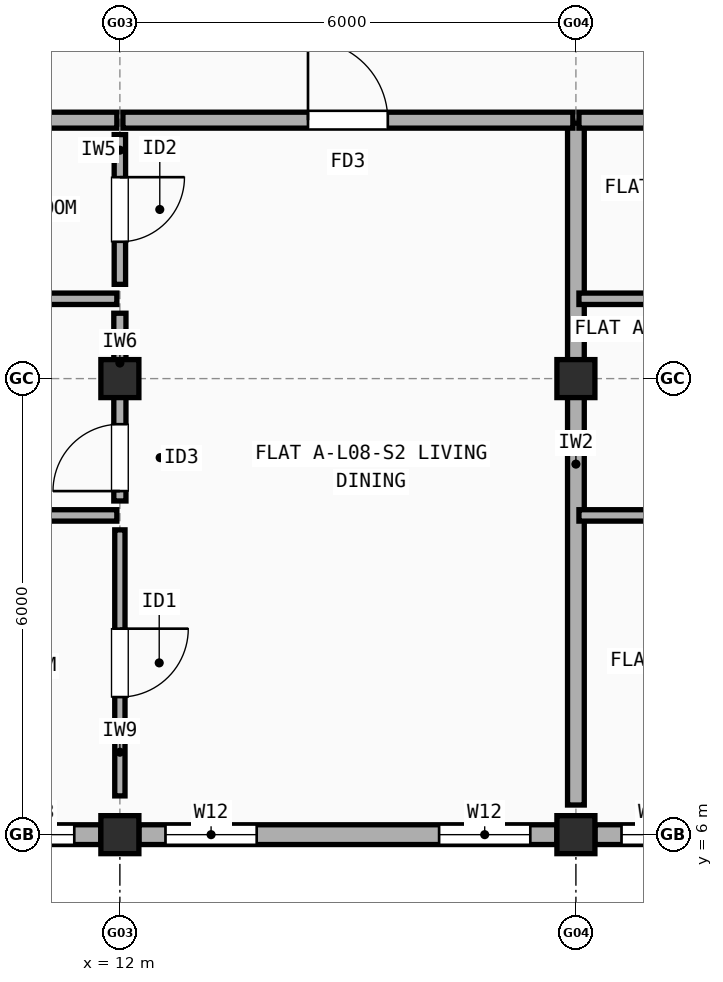
"""IFC4 building model, lengths in metres.
Left out: names, types, materials, properties, quantities, classifications, styles, units other than length and angle.
Written with IfcOpenShell. Run it as: python <this file> out.ifc"""

import sys

from ifc_helpers import new_model, si_unit, direction, frame, frame_2d, origin, origin_2d, place, context, subcontext, project, spatial, rectangle, extrude, element, fill, save


model = new_model("IFC4")
c1 = context("Model", 3, precision=1e-05, world=origin(), true_north=direction((0.0, 1.0)))
c2 = subcontext(c1, "Body", "Model", "MODEL_VIEW")
j1 = project(units=[si_unit("LENGTHUNIT", "METRE"), si_unit("PLANEANGLEUNIT", "RADIAN")], contexts=[c1])
p1 = place(None, origin())
s1 = spatial("IfcSite", under=j1, at=p1, CompositionType="ELEMENT")
p2 = place(p1, origin())
s2 = spatial("IfcBuilding", under=s1, at=p2, CompositionType="ELEMENT")
p3 = place(p2, frame((0.0, 0.0, 26.9)))
s3 = spatial("IfcBuildingStorey", under=s2, at=p3, CompositionType="ELEMENT", Elevation=26.9)
for number, where, z_axis, x_axis in (
    (1, (12.0, 6.0, 0.0), (0.0, 0.0, 1.0), (1.0, 0.0, 0.0)),
    (2, (12.0, 12.0, 0.0), (0.0, 0.0, 1.0), (1.0, 0.0, 0.0)),
    (3, (18.0, 6.0, 0.0), (0.0, 0.0, 1.0), (1.0, 0.0, 0.0)),
    (4, (18.0, 12.0, 0.0), (0.0, 0.0, 1.0), (1.0, 0.0, 0.0)),
):
    element("IfcColumn", number, at=place(p3, frame(where, z_axis=z_axis, x_axis=x_axis)), inside=s3, PredefinedType="COLUMN", context=c2, shape_type="SweptSolid", body=[
        extrude(rectangle(XDim=0.5, YDim=0.5, at=origin_2d()), origin(), (0.0, 0.0, 1.0), 2.98),
    ])
p4 = place(p3, frame((6.25, 6.0, 0.0), z_axis=(0.0, 0.0, 1.0), x_axis=(1.0, 0.0, 0.0)))
e5 = element("IfcWall", 5, at=p4, inside=s3, PredefinedType="STANDARD", context=c2, shape_type="SweptSolid", body=[
    extrude(rectangle(XDim=5.5, YDim=0.26, at=frame_2d((2.75, 0.0))), origin(), (0.0, 0.0, 1.0), 2.462),
])
p5 = place(p4, frame((1.64, 0.0, 0.9)))
e6 = element("IfcOpeningElement", 6, at=p5, cuts=e5, PredefinedType="OPENING", context=c2, shape_type="SweptSolid", body=[
    extrude(rectangle(XDim=1.0, YDim=1.4, at=frame_2d((0.5, 0.7))), frame((0.0, 0.14, 0.0), z_axis=(0.0, -1.0, 0.0), x_axis=(1.0, 0.0, 0.0)), (0.0, 0.0, 1.0), 0.28),
])
p6 = place(p4, frame((4.15, 0.0, 0.9)))
e7 = element("IfcOpeningElement", 7, at=p6, cuts=e5, PredefinedType="OPENING", context=c2, shape_type="SweptSolid", body=[
    extrude(rectangle(XDim=1.0, YDim=1.4, at=frame_2d((0.5, 0.7))), frame((0.0, 0.14, 0.0), z_axis=(0.0, -1.0, 0.0), x_axis=(1.0, 0.0, 0.0)), (0.0, 0.0, 1.0), 0.28),
])
p7 = place(p3, frame((12.25, 6.0, 0.0), z_axis=(0.0, 0.0, 1.0), x_axis=(1.0, 0.0, 0.0)))
e8 = element("IfcWall", 8, at=p7, inside=s3, PredefinedType="STANDARD", context=c2, shape_type="SweptSolid", body=[
    extrude(rectangle(XDim=5.5, YDim=0.26, at=frame_2d((2.75, 0.0))), origin(), (0.0, 0.0, 1.0), 2.462),
])
p8 = place(p7, frame((0.35, 0.0, 0.9)))
e9 = element("IfcOpeningElement", 9, at=p8, cuts=e8, PredefinedType="OPENING", context=c2, shape_type="SweptSolid", body=[
    extrude(rectangle(XDim=1.2, YDim=1.35, at=frame_2d((0.6, 0.675))), frame((0.0, 0.14, 0.0), z_axis=(0.0, -1.0, 0.0), x_axis=(1.0, 0.0, 0.0)), (0.0, 0.0, 1.0), 0.28),
])
p9 = place(p7, frame((3.95, 0.0, 0.9)))
e10 = element("IfcOpeningElement", 10, at=p9, cuts=e8, PredefinedType="OPENING", context=c2, shape_type="SweptSolid", body=[
    extrude(rectangle(XDim=1.2, YDim=1.35, at=frame_2d((0.6, 0.675))), frame((0.0, 0.14, 0.0), z_axis=(0.0, -1.0, 0.0), x_axis=(1.0, 0.0, 0.0)), (0.0, 0.0, 1.0), 0.28),
])
p10 = place(p3, frame((18.25, 6.0, 0.0), z_axis=(0.0, 0.0, 1.0), x_axis=(1.0, 0.0, 0.0)))
e11 = element("IfcWall", 11, at=p10, inside=s3, PredefinedType="STANDARD", context=c2, shape_type="SweptSolid", body=[
    extrude(rectangle(XDim=5.5, YDim=0.26, at=frame_2d((2.75, 0.0))), origin(), (0.0, 0.0, 1.0), 2.462),
])
p11 = place(p10, frame((0.35, 0.0, 0.9)))
e12 = element("IfcOpeningElement", 12, at=p11, cuts=e11, PredefinedType="OPENING", context=c2, shape_type="SweptSolid", body=[
    extrude(rectangle(XDim=0.9, YDim=1.4, at=frame_2d((0.45, 0.7))), frame((0.0, 0.14, 0.0), z_axis=(0.0, -1.0, 0.0), x_axis=(1.0, 0.0, 0.0)), (0.0, 0.0, 1.0), 0.28),
])
p12 = place(p10, frame((2.96, 0.0, 0.9)))
e13 = element("IfcOpeningElement", 13, at=p12, cuts=e11, PredefinedType="OPENING", context=c2, shape_type="SweptSolid", body=[
    extrude(rectangle(XDim=0.9, YDim=1.4, at=frame_2d((0.45, 0.7))), frame((0.0, 0.14, 0.0), z_axis=(0.0, -1.0, 0.0), x_axis=(1.0, 0.0, 0.0)), (0.0, 0.0, 1.0), 0.28),
])
p13 = place(p3, frame((18.0, 6.39, 0.0), z_axis=(0.0, 0.0, 1.0), x_axis=(0.0, 1.0, 0.0)))
e14 = element("IfcWall", 14, at=p13, inside=s3, PredefinedType="SOLIDWALL", context=c2, shape_type="SweptSolid", body=[
    extrude(rectangle(XDim=8.97, YDim=0.22, at=frame_2d((4.485, 0.0))), origin(), (0.0, 0.0, 1.0), 2.508),
])
p14 = place(p3, frame((7.54, 15.4, 0.0), z_axis=(0.0, 0.0, 1.0), x_axis=(1.0, 0.0, 0.0)))
e15 = element("IfcWall", 15, at=p14, inside=s3, PredefinedType="SOLIDWALL", context=c2, shape_type="SweptSolid", body=[
    extrude(rectangle(XDim=4.42, YDim=0.21, at=frame_2d((2.21, 0.0))), origin(), (0.0, 0.0, 1.0), 2.548),
])
p15 = place(p3, frame((12.04, 15.4, 0.0), z_axis=(0.0, 0.0, 1.0), x_axis=(1.0, 0.0, 0.0)))
e16 = element("IfcWall", 16, at=p15, inside=s3, PredefinedType="SOLIDWALL", context=c2, shape_type="SweptSolid", body=[
    extrude(rectangle(XDim=5.92, YDim=0.21, at=frame_2d((2.96, 0.0))), origin(), (0.0, 0.0, 1.0), 2.508),
])
p16 = place(p15, frame((2.435, 0.0, 0.0)))
e17 = element("IfcOpeningElement", 17, at=p16, cuts=e16, PredefinedType="OPENING", context=c2, shape_type="SweptSolid", body=[
    extrude(rectangle(XDim=1.05, YDim=2.15, at=frame_2d((0.525, 1.075))), frame((0.0, 0.115, 0.0), z_axis=(0.0, -1.0, 0.0), x_axis=(1.0, 0.0, 0.0)), (0.0, 0.0, 1.0), 0.23),
])
p17 = place(p3, frame((12.0, 6.51, 0.0), z_axis=(0.0, 0.0, 1.0), x_axis=(0.0, 1.0, 0.0)))
e18 = element("IfcWall", 18, at=p17, inside=s3, PredefinedType="PARTITIONING", context=c2, shape_type="SweptSolid", body=[
    extrude(rectangle(XDim=3.5, YDim=0.135, at=frame_2d((1.75, 0.0))), origin(), (0.0, 0.0, 1.0), 2.458),
])
p18 = place(p17, frame((1.3, 0.0, 0.0)))
e19 = element("IfcOpeningElement", 19, at=p18, cuts=e18, PredefinedType="OPENING", context=c2, shape_type="SweptSolid", body=[
    extrude(rectangle(XDim=0.9, YDim=2.1, at=frame_2d((0.45, 1.05))), frame((0.0, 0.077, 0.0), z_axis=(0.0, -1.0, 0.0), x_axis=(1.0, 0.0, 0.0)), (0.0, 0.0, 1.0), 0.155),
])
p19 = place(p3, frame((12.0, 10.39, 0.0), z_axis=(0.0, 0.0, 1.0), x_axis=(0.0, 1.0, 0.0)))
e20 = element("IfcWall", 20, at=p19, inside=s3, PredefinedType="PLUMBINGWALL", context=c2, shape_type="SweptSolid", body=[
    extrude(rectangle(XDim=2.47, YDim=0.16, at=frame_2d((1.235, 0.0))), origin(), (0.0, 0.0, 1.0), 2.458),
])
p20 = place(p19, frame((0.13, 0.0, 0.0)))
e21 = element("IfcOpeningElement", 21, at=p20, cuts=e20, PredefinedType="OPENING", context=c2, shape_type="SweptSolid", body=[
    extrude(rectangle(XDim=0.88, YDim=2.1, at=frame_2d((0.44, 1.05))), frame((0.0, 0.09, 0.0), z_axis=(0.0, -1.0, 0.0), x_axis=(1.0, 0.0, 0.0)), (0.0, 0.0, 1.0), 0.18),
])
p21 = place(p3, frame((12.0, 13.24, 0.0), z_axis=(0.0, 0.0, 1.0), x_axis=(0.0, 1.0, 0.0)))
e22 = element("IfcWall", 22, at=p21, inside=s3, PredefinedType="PARTITIONING", context=c2, shape_type="SweptSolid", body=[
    extrude(rectangle(XDim=1.97, YDim=0.15, at=frame_2d((0.985, 0.0))), origin(), (0.0, 0.0, 1.0), 2.548),
])
p22 = place(p21, frame((0.56, 0.0, 0.0)))
e23 = element("IfcOpeningElement", 23, at=p22, cuts=e22, PredefinedType="OPENING", context=c2, shape_type="SweptSolid", body=[
    extrude(rectangle(XDim=0.85, YDim=2.1, at=frame_2d((0.425, 1.05))), frame((0.0, 0.085, 0.0), z_axis=(0.0, -1.0, 0.0), x_axis=(1.0, 0.0, 0.0)), (0.0, 0.0, 1.0), 0.17),
])
p23 = place(p3, frame((7.54, 10.2, 0.0), z_axis=(0.0, 0.0, 1.0), x_axis=(1.0, 0.0, 0.0)))
e24 = element("IfcWall", 24, at=p23, inside=s3, PredefinedType="PARTITIONING", context=c2, shape_type="SweptSolid", body=[
    extrude(rectangle(XDim=4.42, YDim=0.15, at=frame_2d((2.21, 0.0))), origin(), (0.0, 0.0, 1.0), 2.458),
])
p24 = place(p3, frame((7.54, 13.05, 0.0), z_axis=(0.0, 0.0, 1.0), x_axis=(1.0, 0.0, 0.0)))
e25 = element("IfcWall", 25, at=p24, inside=s3, PredefinedType="PARTITIONING", context=c2, shape_type="SweptSolid", body=[
    extrude(rectangle(XDim=4.42, YDim=0.15, at=frame_2d((2.21, 0.0))), origin(), (0.0, 0.0, 1.0), 2.548),
])
p25 = place(p3, frame((18.04, 15.4, 0.0), z_axis=(0.0, 0.0, 1.0), x_axis=(1.0, 0.0, 0.0)))
e26 = element("IfcWall", 26, at=p25, inside=s3, PredefinedType="SOLIDWALL", context=c2, shape_type="SweptSolid", body=[
    extrude(rectangle(XDim=4.42, YDim=0.21, at=frame_2d((2.21, 0.0))), origin(), (0.0, 0.0, 1.0), 2.508),
])
p26 = place(p3, frame((18.04, 10.2, 0.0), z_axis=(0.0, 0.0, 1.0), x_axis=(1.0, 0.0, 0.0)))
e27 = element("IfcWall", 27, at=p26, inside=s3, PredefinedType="PARTITIONING", context=c2, shape_type="SweptSolid", body=[
    extrude(rectangle(XDim=4.42, YDim=0.15, at=frame_2d((2.21, 0.0))), origin(), (0.0, 0.0, 1.0), 2.548),
])
p27 = place(p3, frame((18.04, 13.05, 0.0), z_axis=(0.0, 0.0, 1.0), x_axis=(1.0, 0.0, 0.0)))
e28 = element("IfcWall", 28, at=p27, inside=s3, PredefinedType="PARTITIONING", context=c2, shape_type="SweptSolid", body=[
    extrude(rectangle(XDim=4.42, YDim=0.15, at=frame_2d((2.21, 0.0))), origin(), (0.0, 0.0, 1.0), 2.508),
])
p28 = place(p6, origin())
e29 = element("IfcWindow", 29, at=p28, inside=s3, PartitioningType="SINGLE_PANEL", PredefinedType="WINDOW", context=c2, shape_type="SweptSolid", body=[
    extrude(rectangle(XDim=1.0, YDim=1.4, at=frame_2d((0.5, 0.7))), frame((0.0, 0.03, 0.0), z_axis=(0.0, -1.0, 0.0), x_axis=(1.0, 0.0, 0.0)), (0.0, 0.0, 1.0), 0.06),
])
fill(e7, e29)
p29 = place(p8, origin())
e30 = element("IfcWindow", 30, at=p29, inside=s3, PartitioningType="SINGLE_PANEL", PredefinedType="WINDOW", context=c2, shape_type="SweptSolid", body=[
    extrude(rectangle(XDim=1.2, YDim=1.35, at=frame_2d((0.6, 0.675))), frame((0.0, 0.03, 0.0), z_axis=(0.0, -1.0, 0.0), x_axis=(1.0, 0.0, 0.0)), (0.0, 0.0, 1.0), 0.06),
])
fill(e9, e30)
p30 = place(p9, origin())
e31 = element("IfcWindow", 31, at=p30, inside=s3, PartitioningType="SINGLE_PANEL", PredefinedType="WINDOW", context=c2, shape_type="SweptSolid", body=[
    extrude(rectangle(XDim=1.2, YDim=1.35, at=frame_2d((0.6, 0.675))), frame((0.0, 0.03, 0.0), z_axis=(0.0, -1.0, 0.0), x_axis=(1.0, 0.0, 0.0)), (0.0, 0.0, 1.0), 0.06),
])
fill(e10, e31)
p31 = place(p11, origin())
e32 = element("IfcWindow", 32, at=p31, inside=s3, PartitioningType="SINGLE_PANEL", PredefinedType="WINDOW", context=c2, shape_type="SweptSolid", body=[
    extrude(rectangle(XDim=0.9, YDim=1.4, at=frame_2d((0.45, 0.7))), frame((0.0, 0.03, 0.0), z_axis=(0.0, -1.0, 0.0), x_axis=(1.0, 0.0, 0.0)), (0.0, 0.0, 1.0), 0.06),
])
fill(e12, e32)
p32 = place(p16, origin())
e33 = element("IfcDoor", 33, at=p32, inside=s3, OperationType="SINGLE_SWING_LEFT", PredefinedType="DOOR", context=c2, shape_type="SweptSolid", body=[
    extrude(rectangle(XDim=1.05, YDim=2.15, at=frame_2d((0.525, 1.075))), frame((0.0, 0.025, 0.0), z_axis=(0.0, -1.0, 0.0), x_axis=(1.0, 0.0, 0.0)), (0.0, 0.0, 1.0), 0.05),
])
fill(e17, e33)
p33 = place(p18, origin())
e34 = element("IfcDoor", 34, at=p33, inside=s3, OperationType="SINGLE_SWING_RIGHT", PredefinedType="DOOR", context=c2, shape_type="SweptSolid", body=[
    extrude(rectangle(XDim=0.9, YDim=2.1, at=frame_2d((0.45, 1.05))), frame((0.0, 0.025, 0.0), z_axis=(0.0, -1.0, 0.0), x_axis=(1.0, 0.0, 0.0)), (0.0, 0.0, 1.0), 0.05),
])
fill(e19, e34)
p34 = place(p20, origin())
e35 = element("IfcDoor", 35, at=p34, inside=s3, OperationType="SINGLE_SWING_LEFT", PredefinedType="DOOR", context=c2, shape_type="SweptSolid", body=[
    extrude(rectangle(XDim=0.88, YDim=2.1, at=frame_2d((0.44, 1.05))), frame((0.0, 0.025, 0.0), z_axis=(0.0, -1.0, 0.0), x_axis=(1.0, 0.0, 0.0)), (0.0, 0.0, 1.0), 0.05),
])
fill(e21, e35)
p35 = place(p22, origin())
e36 = element("IfcDoor", 36, at=p35, inside=s3, OperationType="SINGLE_SWING_RIGHT", PredefinedType="DOOR", context=c2, shape_type="SweptSolid", body=[
    extrude(rectangle(XDim=0.85, YDim=2.1, at=frame_2d((0.425, 1.05))), frame((0.0, 0.025, 0.0), z_axis=(0.0, -1.0, 0.0), x_axis=(1.0, 0.0, 0.0)), (0.0, 0.0, 1.0), 0.05),
])
fill(e23, e36)
save(model, sys.argv[1])
